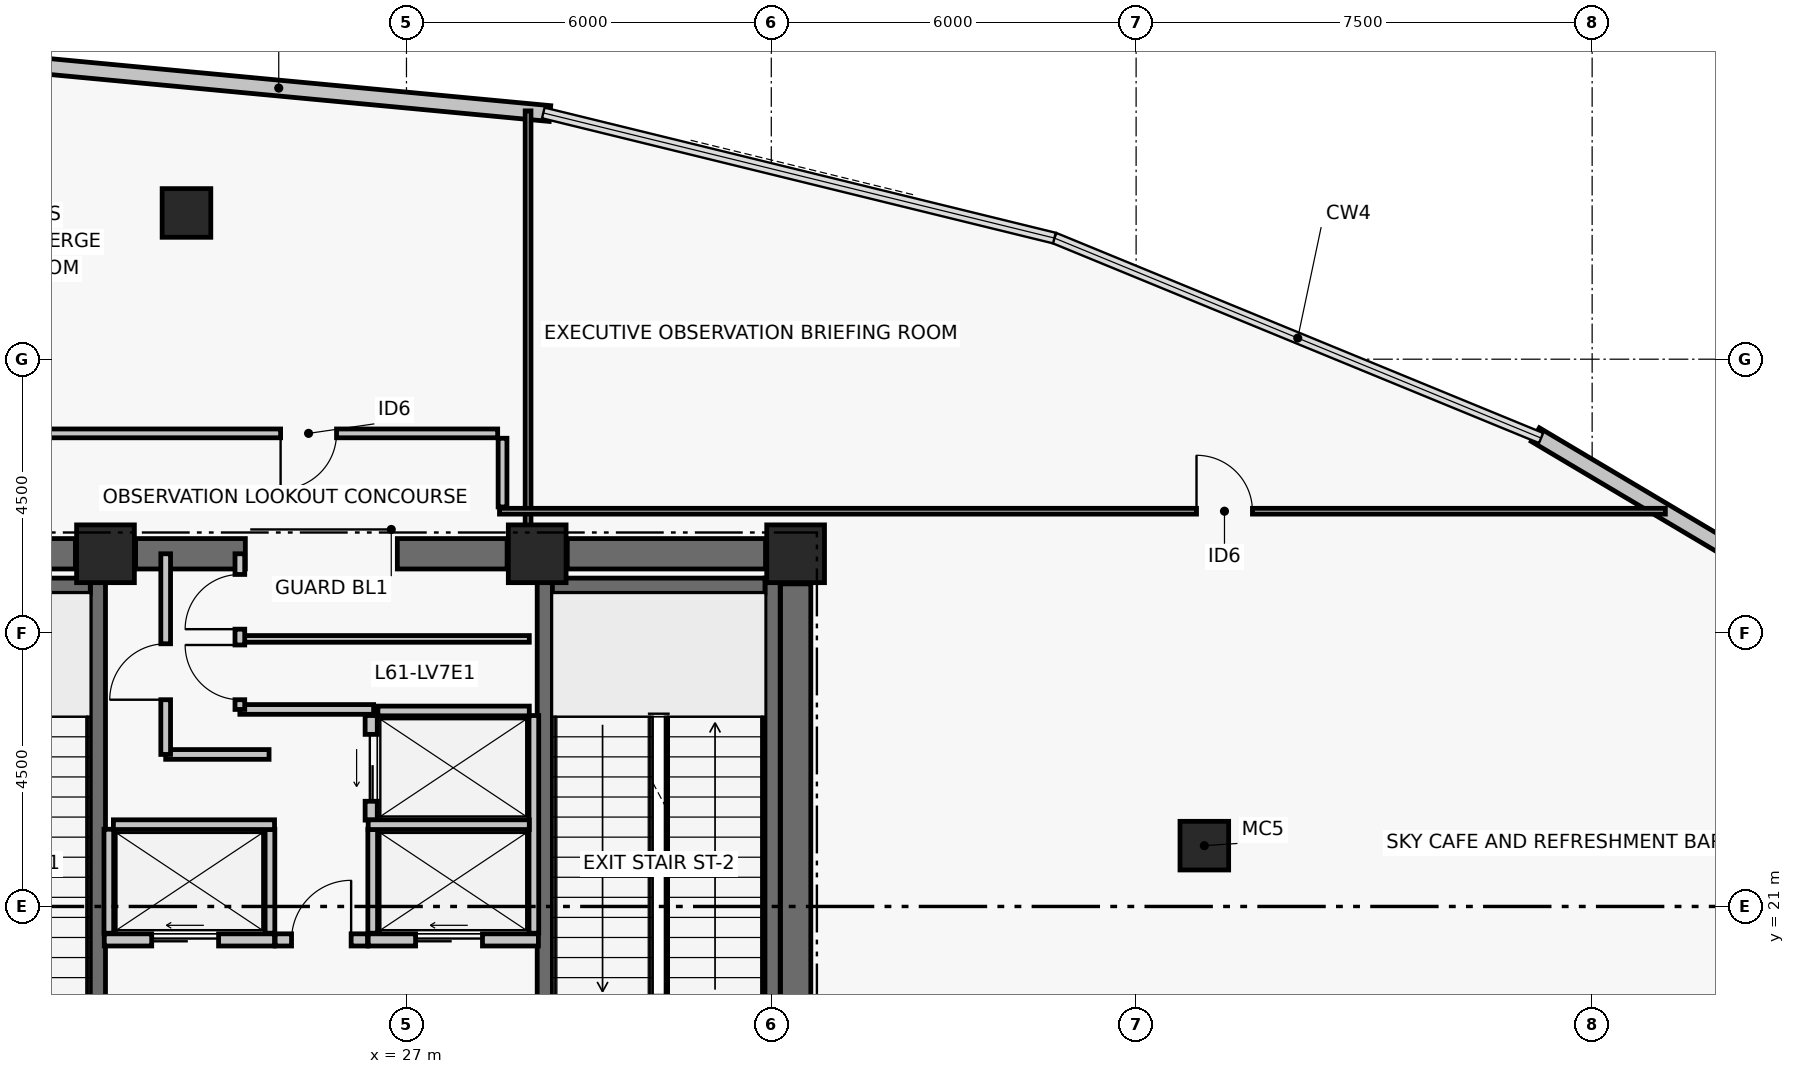
"""IFC4 building model, lengths in metres.
Left out: names, types, materials, properties, quantities, classifications, styles, units other than length and angle.
Written with IfcOpenShell. Run it as: python <this file> out.ifc"""

import sys

from ifc_helpers import new_model, si_unit, direction, frame, frame_2d, origin, origin_2d, place, context, subcontext, project, spatial, rectangle, hollow_rectangle, extrude, element, fill, save


model = new_model("IFC4")
c1 = context("Model", 3, precision=1e-05, world=origin(), true_north=direction((0.0, 1.0)))
c2 = subcontext(c1, "Body", "Model", "MODEL_VIEW")
j1 = project(units=[si_unit("LENGTHUNIT", "METRE"), si_unit("PLANEANGLEUNIT", "RADIAN")], contexts=[c1])
p1 = place(None, origin())
s1 = spatial("IfcSite", under=j1, at=p1, CompositionType="ELEMENT")
p2 = place(p1, origin())
s2 = spatial("IfcBuilding", under=s1, at=p2, CompositionType="ELEMENT")
p3 = place(p2, frame((0.0, 0.0, 242.64)))
s3 = spatial("IfcBuildingStorey", under=s2, at=p3, CompositionType="ELEMENT", Elevation=242.64)
for number, where, z_axis, x_axis in (
    (1, (22.05, 26.8, 0.0), (0.0, 0.0, 1.0), (1.0, 0.0, 0.0)),
    (2, (29.15, 26.8, 0.0), (0.0, 0.0, 1.0), (1.0, 0.0, 0.0)),
    (3, (33.4, 26.8, 0.0), (0.0, 0.0, 1.0), (1.0, 0.0, 0.0)),
):
    element("IfcColumn", number, at=place(p3, frame(where, z_axis=z_axis, x_axis=x_axis)), inside=s3, PredefinedType="COLUMN", context=c2, shape_type="SweptSolid", body=[
        extrude(rectangle(XDim=0.95, YDim=0.95, at=origin_2d()), origin(), (0.0, 0.0, 1.0), 4.5),
    ])
p4 = place(p3, frame((18.295, 26.8, 0.0), z_axis=(0.0, 0.0, 1.0), x_axis=(1.0, 0.0, 0.0)))
e4 = element("IfcWall", 4, at=p4, inside=s3, PredefinedType="SHEAR", context=c2, shape_type="SweptSolid", body=[
    extrude(rectangle(XDim=3.26, YDim=0.5, at=frame_2d((1.63, 0.0))), origin(), (0.0, 0.0, 1.0), 4.28),
])
p5 = place(p3, frame((22.545, 26.8, 0.0), z_axis=(0.0, 0.0, 1.0), x_axis=(1.0, 0.0, 0.0)))
e5 = element("IfcWall", 5, at=p5, inside=s3, PredefinedType="SHEAR", context=c2, shape_type="SweptSolid", body=[
    extrude(rectangle(XDim=1.805, YDim=0.5, at=frame_2d((0.903, 0.0))), origin(), (0.0, 0.0, 1.0), 4.28),
])
p6 = place(p3, frame((26.85, 26.8, 0.0), z_axis=(0.0, 0.0, 1.0), x_axis=(1.0, 0.0, 0.0)))
e6 = element("IfcWall", 6, at=p6, inside=s3, PredefinedType="SHEAR", context=c2, shape_type="SweptSolid", body=[
    extrude(rectangle(XDim=1.805, YDim=0.5, at=frame_2d((0.902, 0.0))), origin(), (0.0, 0.0, 1.0), 4.28),
])
p7 = place(p3, frame((29.645, 26.8, 0.0), z_axis=(0.0, 0.0, 1.0), x_axis=(1.0, 0.0, 0.0)))
e7 = element("IfcWall", 7, at=p7, inside=s3, PredefinedType="SHEAR", context=c2, shape_type="SweptSolid", body=[
    extrude(rectangle(XDim=3.26, YDim=0.5, at=frame_2d((1.63, 0.0))), origin(), (0.0, 0.0, 1.0), 4.28),
])
p8 = place(p3, frame((33.4, 17.695, 0.0), z_axis=(0.0, 0.0, 1.0), x_axis=(0.0, 1.0, 0.0)))
e8 = element("IfcWall", 8, at=p8, inside=s3, PredefinedType="SHEAR", context=c2, shape_type="SweptSolid", body=[
    extrude(rectangle(XDim=8.61, YDim=0.5, at=frame_2d((4.305, 0.0))), origin(), (0.0, 0.0, 1.0), 4.28),
])
p9 = place(p3, frame((21.925, 17.6, 0.0), z_axis=(0.0, 0.0, 1.0), x_axis=(0.0, 1.0, 0.0)))
e9 = element("IfcWall", 9, at=p9, inside=s3, PredefinedType="SHEAR", context=c2, shape_type="SweptSolid", body=[
    extrude(rectangle(XDim=8.8, YDim=0.25, at=frame_2d((4.4, 0.0))), origin(), (0.0, 0.0, 1.0), 4.28),
])
p10 = place(p9, frame((0.35, 0.0, 0.0)))
e10 = element("IfcOpeningElement", 10, at=p10, cuts=e9, PredefinedType="OPENING", context=c2, shape_type="SweptSolid", body=[
    extrude(rectangle(XDim=1.05, YDim=2.08, at=frame_2d((0.525, 1.04))), frame((0.0, 0.135, 0.0), z_axis=(0.0, -1.0, 0.0), x_axis=(1.0, 0.0, 0.0)), (0.0, 0.0, 1.0), 0.27),
])
p11 = place(p3, frame((18.304, 26.275, 0.0), z_axis=(0.0, 0.0, 1.0), x_axis=(1.0, 0.0, 0.0)))
e11 = element("IfcWall", 11, at=p11, inside=s3, PredefinedType="SHEAR", context=c2, shape_type="SweptSolid", body=[
    extrude(rectangle(XDim=3.496, YDim=0.25, at=frame_2d((1.748, 0.0))), origin(), (0.0, 0.0, 1.0), 4.28),
])
p12 = place(p3, frame((29.275, 17.6, 0.0), z_axis=(0.0, 0.0, 1.0), x_axis=(0.0, 1.0, 0.0)))
e12 = element("IfcWall", 12, at=p12, inside=s3, PredefinedType="SHEAR", context=c2, shape_type="SweptSolid", body=[
    extrude(rectangle(XDim=8.8, YDim=0.25, at=frame_2d((4.4, 0.0))), origin(), (0.0, 0.0, 1.0), 4.28),
])
p13 = place(p12, frame((0.35, 0.0, 0.0)))
e13 = element("IfcOpeningElement", 13, at=p13, cuts=e12, PredefinedType="OPENING", context=c2, shape_type="SweptSolid", body=[
    extrude(rectangle(XDim=1.05, YDim=2.08, at=frame_2d((0.525, 1.04))), frame((0.0, 0.135, 0.0), z_axis=(0.0, -1.0, 0.0), x_axis=(1.0, 0.0, 0.0)), (0.0, 0.0, 1.0), 0.27),
])
p14 = place(p3, frame((33.021, 17.6, 0.0), z_axis=(0.0, 0.0, 1.0), x_axis=(0.0, 1.0, 0.0)))
e14 = element("IfcWall", 14, at=p14, inside=s3, PredefinedType="SHEAR", context=c2, shape_type="SweptSolid", body=[
    extrude(rectangle(XDim=8.8, YDim=0.25, at=frame_2d((4.4, 0.0))), origin(), (0.0, 0.0, 1.0), 4.28),
])
p15 = place(p3, frame((29.4, 26.275, 0.0), z_axis=(0.0, 0.0, 1.0), x_axis=(1.0, 0.0, 0.0)))
e15 = element("IfcWall", 15, at=p15, inside=s3, PredefinedType="SHEAR", context=c2, shape_type="SweptSolid", body=[
    extrude(rectangle(XDim=3.496, YDim=0.25, at=frame_2d((1.748, 0.0))), origin(), (0.0, 0.0, 1.0), 4.28),
])
for number, where, z_axis, x_axis in (
    (16, (40.122, 22.0, 0.0), (0.0, 0.0, 1.0), (1.0, 0.0, 0.0)),
    (17, (23.382, 32.405, 0.0), (0.0, 0.0, 1.0), (1.0, 0.0, 0.0)),
):
    element("IfcColumn", number, at=place(p3, frame(where, z_axis=z_axis, x_axis=x_axis)), inside=s3, PredefinedType="COLUMN", context=c2, shape_type="SweptSolid", body=[
        extrude(hollow_rectangle(XDim=0.8, YDim=0.8, WallThickness=0.035, at=origin_2d()), origin(), (0.0, 0.0, 1.0), 4.5),
    ])
p16 = place(p3, frame((45.566, 28.76, 0.0), z_axis=(0.0, 0.0, 1.0), x_axis=(0.859615449495, -0.510941561227, 0.0)))
e18 = element("IfcWall", 18, at=p16, inside=s3, PredefinedType="PARTITIONING", context=c2, shape_type="SweptSolid", body=[
    extrude(rectangle(XDim=8.961, YDim=0.26, at=frame_2d((4.48, 0.0))), origin(), (0.0, 0.0, 1.0), 4.28),
])
p17 = place(p3, frame((20.438, 34.878, 0.0), z_axis=(0.0, 0.0, 1.0), x_axis=(0.995616246459, -0.093532292754, 0.0)))
e19 = element("IfcWall", 19, at=p17, inside=s3, PredefinedType="PARTITIONING", context=c2, shape_type="SweptSolid", body=[
    extrude(rectangle(XDim=8.961, YDim=0.26, at=frame_2d((4.48, 0.0))), origin(), (0.0, 0.0, 1.0), 4.28),
])
p18 = place(p3, frame((53.269, 19.819, 0.0), z_axis=(0.0, 0.0, 1.0), x_axis=(-0.859615449495, -0.510941561227, 0.0)))
e20 = element("IfcWall", 20, at=p18, inside=s3, PredefinedType="PARTITIONING", context=c2, shape_type="SweptSolid", body=[
    extrude(rectangle(XDim=8.961, YDim=0.26, at=frame_2d((4.48, 0.0))), origin(), (0.0, 0.0, 1.0), 4.28),
])
p19 = place(p3, frame((24.84, 20.45, 0.0), z_axis=(0.0, 0.0, 1.0), x_axis=(1.0, 0.0, 0.0)))
e21 = element("IfcWall", 21, at=p19, inside=s3, PredefinedType="PARTITIONING", context=c2, shape_type="SweptSolid", body=[
    extrude(rectangle(XDim=1.52, YDim=0.2, at=frame_2d((0.76, 0.0))), origin(), (0.0, 0.0, 1.0), 4.28),
])
p20 = place(p19, frame((0.27, 0.0, 0.0)))
e22 = element("IfcOpeningElement", 22, at=p20, cuts=e21, PredefinedType="OPENING", context=c2, shape_type="SweptSolid", body=[
    extrude(rectangle(XDim=0.98, YDim=2.06, at=frame_2d((0.49, 1.03))), frame((0.0, 0.11, 0.0), z_axis=(0.0, -1.0, 0.0), x_axis=(1.0, 0.0, 0.0)), (0.0, 0.0, 1.0), 0.22),
])
p21 = place(p3, frame((22.03, 20.45, 0.0), z_axis=(0.0, 0.0, 1.0), x_axis=(1.0, 0.0, 0.0)))
e23 = element("IfcWall", 23, at=p21, inside=s3, PredefinedType="PARTITIONING", context=c2, shape_type="SweptSolid", body=[
    extrude(rectangle(XDim=2.8, YDim=0.2, at=frame_2d((1.4, 0.0))), origin(), (0.0, 0.0, 1.0), 4.28),
])
p22 = place(p21, frame((0.78, 0.0, 0.0)))
e24 = element("IfcOpeningElement", 24, at=p22, cuts=e23, PredefinedType="OPENING", context=c2, shape_type="SweptSolid", body=[
    extrude(rectangle(XDim=1.1, YDim=2.08, at=frame_2d((0.55, 1.04))), frame((0.0, 0.11, 0.0), z_axis=(0.0, -1.0, 0.0), x_axis=(1.0, 0.0, 0.0)), (0.0, 0.0, 1.0), 0.22),
])
p23 = place(p3, frame((26.37, 20.45, 0.0), z_axis=(0.0, 0.0, 1.0), x_axis=(1.0, 0.0, 0.0)))
e25 = element("IfcWall", 25, at=p23, inside=s3, PredefinedType="PARTITIONING", context=c2, shape_type="SweptSolid", body=[
    extrude(rectangle(XDim=2.8, YDim=0.2, at=frame_2d((1.4, 0.0))), origin(), (0.0, 0.0, 1.0), 4.28),
])
p24 = place(p23, frame((0.78, 0.0, 0.0)))
e26 = element("IfcOpeningElement", 26, at=p24, cuts=e25, PredefinedType="OPENING", context=c2, shape_type="SweptSolid", body=[
    extrude(rectangle(XDim=1.1, YDim=2.08, at=frame_2d((0.55, 1.04))), frame((0.0, 0.11, 0.0), z_axis=(0.0, -1.0, 0.0), x_axis=(1.0, 0.0, 0.0)), (0.0, 0.0, 1.0), 0.22),
])
p25 = place(p3, frame((26.42, 22.42, 0.0), z_axis=(0.0, 0.0, 1.0), x_axis=(0.0, 1.0, 0.0)))
e27 = element("IfcWall", 27, at=p25, inside=s3, PredefinedType="PARTITIONING", context=c2, shape_type="SweptSolid", body=[
    extrude(rectangle(XDim=1.72, YDim=0.2, at=frame_2d((0.86, 0.0))), origin(), (0.0, 0.0, 1.0), 4.28),
])
p26 = place(p25, frame((0.31, 0.0, 0.0)))
e28 = element("IfcOpeningElement", 28, at=p26, cuts=e27, PredefinedType="OPENING", context=c2, shape_type="SweptSolid", body=[
    extrude(rectangle(XDim=1.1, YDim=2.08, at=frame_2d((0.55, 1.04))), frame((0.0, 0.11, 0.0), z_axis=(0.0, -1.0, 0.0), x_axis=(1.0, 0.0, 0.0)), (0.0, 0.0, 1.0), 0.22),
])
for number, where, z_axis, x_axis in (
    (29, (22.105, 20.56, 0.0), (0.0, 0.0, 1.0), (0.0, 1.0, 0.0)),
    (30, (24.755, 20.56, 0.0), (0.0, 0.0, 1.0), (0.0, 1.0, 0.0)),
):
    element("IfcWall", number, at=place(p3, frame(where, z_axis=z_axis, x_axis=x_axis)), inside=s3, PredefinedType="PARTITIONING", context=c2, shape_type="SweptSolid", body=[
        extrude(rectangle(XDim=1.71, YDim=0.16, at=frame_2d((0.855, 0.0))), origin(), (0.0, 0.0, 1.0), 4.28),
    ])
p27 = place(p3, frame((22.18, 22.345, 0.0), z_axis=(0.0, 0.0, 1.0), x_axis=(1.0, 0.0, 0.0)))
e31 = element("IfcWall", 31, at=p27, inside=s3, PredefinedType="PARTITIONING", context=c2, shape_type="SweptSolid", body=[
    extrude(rectangle(XDim=2.65, YDim=0.16, at=frame_2d((1.325, 0.0))), origin(), (0.0, 0.0, 1.0), 4.28),
])
p28 = place(p3, frame((29.095, 20.56, 0.0), z_axis=(0.0, 0.0, 1.0), x_axis=(0.0, 1.0, 0.0)))
e32 = element("IfcWall", 32, at=p28, inside=s3, PredefinedType="PARTITIONING", context=c2, shape_type="SweptSolid", body=[
    extrude(rectangle(XDim=3.58, YDim=0.16, at=frame_2d((1.79, 0.0))), origin(), (0.0, 0.0, 1.0), 4.28),
])
p29 = place(p3, frame((26.445, 20.56, 0.0), z_axis=(0.0, 0.0, 1.0), x_axis=(0.0, 1.0, 0.0)))
e33 = element("IfcWall", 33, at=p29, inside=s3, PredefinedType="PARTITIONING", context=c2, shape_type="SweptSolid", body=[
    extrude(rectangle(XDim=1.71, YDim=0.16, at=frame_2d((0.855, 0.0))), origin(), (0.0, 0.0, 1.0), 4.28),
])
p30 = place(p3, frame((26.37, 22.345, 0.0), z_axis=(0.0, 0.0, 1.0), x_axis=(1.0, 0.0, 0.0)))
e34 = element("IfcWall", 34, at=p30, inside=s3, PredefinedType="PARTITIONING", context=c2, shape_type="SweptSolid", body=[
    extrude(rectangle(XDim=2.65, YDim=0.16, at=frame_2d((1.325, 0.0))), origin(), (0.0, 0.0, 1.0), 4.28),
])
p31 = place(p3, frame((26.53, 24.215, 0.0), z_axis=(0.0, 0.0, 1.0), x_axis=(1.0, 0.0, 0.0)))
e35 = element("IfcWall", 35, at=p31, inside=s3, PredefinedType="PARTITIONING", context=c2, shape_type="SweptSolid", body=[
    extrude(rectangle(XDim=2.49, YDim=0.16, at=frame_2d((1.245, 0.0))), origin(), (0.0, 0.0, 1.0), 4.28),
])
p32 = place(p3, frame((23.04, 23.5, 0.0), z_axis=(0.0, 0.0, 1.0), x_axis=(1.0, 0.0, 0.0)))
e36 = element("IfcWall", 36, at=p32, inside=s3, PredefinedType="PARTITIONING", context=c2, shape_type="SweptSolid", body=[
    extrude(rectangle(XDim=1.7, YDim=0.16, at=frame_2d((0.85, 0.0))), origin(), (0.0, 0.0, 1.0), 4.28),
])
p33 = place(p3, frame((23.04, 23.5, 0.0), z_axis=(0.0, 0.0, 1.0), x_axis=(0.0, 1.0, 0.0)))
e37 = element("IfcWall", 37, at=p33, inside=s3, PredefinedType="PARTITIONING", context=c2, shape_type="SweptSolid", body=[
    extrude(rectangle(XDim=3.3, YDim=0.16, at=frame_2d((1.65, 0.0))), origin(), (0.0, 0.0, 1.0), 3.41),
])
p34 = place(p33, frame((0.9, 0.0, 0.0)))
e38 = element("IfcOpeningElement", 38, at=p34, cuts=e37, PredefinedType="OPENING", context=c2, shape_type="SweptSolid", body=[
    extrude(rectangle(XDim=0.92, YDim=2.05, at=frame_2d((0.46, 1.025))), frame((0.0, 0.09, 0.0), z_axis=(0.0, -1.0, 0.0), x_axis=(1.0, 0.0, 0.0)), (0.0, 0.0, 1.0), 0.18),
])
p35 = place(p3, frame((24.26, 24.24, 0.0), z_axis=(0.0, 0.0, 1.0), x_axis=(1.0, 0.0, 0.0)))
e39 = element("IfcWall", 39, at=p35, inside=s3, PredefinedType="PARTITIONING", context=c2, shape_type="SweptSolid", body=[
    extrude(rectangle(XDim=2.2, YDim=0.16, at=frame_2d((1.1, 0.0))), origin(), (0.0, 0.0, 1.0), 4.28),
])
p36 = place(p3, frame((24.26, 25.4, 0.0), z_axis=(0.0, 0.0, 1.0), x_axis=(1.0, 0.0, 0.0)))
e40 = element("IfcWall", 40, at=p36, inside=s3, PredefinedType="PARTITIONING", context=c2, shape_type="SweptSolid", body=[
    extrude(rectangle(XDim=4.76, YDim=0.11, at=frame_2d((2.38, 0.0))), origin(), (0.0, 0.0, 1.0), 4.28),
])
p37 = place(p3, frame((24.26, 24.24, 0.0), z_axis=(0.0, 0.0, 1.0), x_axis=(0.0, 1.0, 0.0)))
e41 = element("IfcWall", 41, at=p37, inside=s3, PredefinedType="PARTITIONING", context=c2, shape_type="SweptSolid", body=[
    extrude(rectangle(XDim=2.56, YDim=0.16, at=frame_2d((1.28, 0.0))), origin(), (0.0, 0.0, 1.0), 3.41),
])
p38 = place(p37, frame((0.16, 0.0, 0.0)))
e42 = element("IfcOpeningElement", 42, at=p38, cuts=e41, PredefinedType="OPENING", context=c2, shape_type="SweptSolid", body=[
    extrude(rectangle(XDim=0.9, YDim=2.02, at=frame_2d((0.45, 1.01))), frame((0.0, 0.09, 0.0), z_axis=(0.0, -1.0, 0.0), x_axis=(1.0, 0.0, 0.0)), (0.0, 0.0, 1.0), 0.18),
])
p39 = place(p37, frame((1.32, 0.0, 0.0)))
e43 = element("IfcOpeningElement", 43, at=p39, cuts=e41, PredefinedType="OPENING", context=c2, shape_type="SweptSolid", body=[
    extrude(rectangle(XDim=0.9, YDim=2.02, at=frame_2d((0.45, 1.01))), frame((0.0, 0.09, 0.0), z_axis=(0.0, -1.0, 0.0), x_axis=(1.0, 0.0, 0.0)), (0.0, 0.0, 1.0), 0.18),
])
p40 = place(p3, frame((28.58, 27.57, 0.0), z_axis=(0.0, 0.0, 1.0), x_axis=(0.0, 1.0, 0.0)))
e44 = element("IfcWall", 44, at=p40, inside=s3, PredefinedType="PARTITIONING", context=c2, shape_type="SweptSolid", body=[
    extrude(rectangle(XDim=1.13, YDim=0.145, at=frame_2d((0.565, 0.0))), origin(), (0.0, 0.0, 1.0), 4.28),
])
p41 = place(p3, frame((28.5, 28.78, 0.0), z_axis=(0.0, 0.0, 1.0), x_axis=(-1.0, 0.0, 0.0)))
e45 = element("IfcWall", 45, at=p41, inside=s3, PredefinedType="PARTITIONING", context=c2, shape_type="SweptSolid", body=[
    extrude(rectangle(XDim=10.96, YDim=0.145, at=frame_2d((5.48, 0.0))), origin(), (0.0, 0.0, 1.0), 3.56),
])
p42 = place(p41, frame((2.65, 0.0, 0.0)))
e46 = element("IfcOpeningElement", 46, at=p42, cuts=e45, PredefinedType="OPENING", context=c2, shape_type="SweptSolid", body=[
    extrude(rectangle(XDim=0.92, YDim=2.05, at=frame_2d((0.46, 1.025))), frame((0.0, 0.083, 0.0), z_axis=(0.0, -1.0, 0.0), x_axis=(1.0, 0.0, 0.0)), (0.0, 0.0, 1.0), 0.165),
])
p43 = place(p3, frame((29.0, 27.17, 0.0), z_axis=(0.0, 0.0, 1.0), x_axis=(0.0, 1.0, 0.0)))
e47 = element("IfcWall", 47, at=p43, inside=s3, PredefinedType="PARTITIONING", context=c2, shape_type="SweptSolid", body=[
    extrude(rectangle(XDim=6.914, YDim=0.095, at=frame_2d((3.457, 0.0))), origin(), (0.0, 0.0, 1.0), 3.41),
])
p44 = place(p3, frame((28.53, 27.5, 0.0), z_axis=(0.0, 0.0, 1.0), x_axis=(1.0, 0.0, 0.0)))
e48 = element("IfcWall", 48, at=p44, inside=s3, PredefinedType="PARTITIONING", context=c2, shape_type="SweptSolid", body=[
    extrude(rectangle(XDim=19.174, YDim=0.095, at=frame_2d((9.587, 0.0))), origin(), (0.0, 0.0, 1.0), 3.76),
])
p45 = place(p44, frame((11.463, 0.0, 0.0)))
e49 = element("IfcOpeningElement", 49, at=p45, cuts=e48, PredefinedType="OPENING", context=c2, shape_type="SweptSolid", body=[
    extrude(rectangle(XDim=0.92, YDim=2.05, at=frame_2d((0.46, 1.025))), frame((0.0, 0.057, 0.0), z_axis=(0.0, -1.0, 0.0), x_axis=(1.0, 0.0, 0.0)), (0.0, 0.0, 1.0), 0.115),
])
p46 = place(p20, origin())
e50 = element("IfcDoor", 50, at=p46, inside=s3, OperationType="SINGLE_SWING_RIGHT", PredefinedType="DOOR", context=c2, shape_type="SweptSolid", body=[
    extrude(rectangle(XDim=0.98, YDim=2.06, at=frame_2d((0.49, 1.03))), frame((0.0, 0.025, 0.0), z_axis=(0.0, -1.0, 0.0), x_axis=(1.0, 0.0, 0.0)), (0.0, 0.0, 1.0), 0.05),
])
fill(e22, e50)
p47 = place(p22, origin())
e51 = element("IfcDoor", 51, at=p47, inside=s3, OperationType="DOUBLE_DOOR_SLIDING", PredefinedType="DOOR", context=c2, shape_type="SweptSolid", body=[
    extrude(rectangle(XDim=1.1, YDim=2.08, at=frame_2d((0.55, 1.04))), frame((0.0, 0.025, 0.0), z_axis=(0.0, -1.0, 0.0), x_axis=(1.0, 0.0, 0.0)), (0.0, 0.0, 1.0), 0.05),
])
fill(e24, e51)
p48 = place(p24, origin())
e52 = element("IfcDoor", 52, at=p48, inside=s3, OperationType="DOUBLE_DOOR_SLIDING", PredefinedType="DOOR", context=c2, shape_type="SweptSolid", body=[
    extrude(rectangle(XDim=1.1, YDim=2.08, at=frame_2d((0.55, 1.04))), frame((0.0, 0.025, 0.0), z_axis=(0.0, -1.0, 0.0), x_axis=(1.0, 0.0, 0.0)), (0.0, 0.0, 1.0), 0.05),
])
fill(e26, e52)
p49 = place(p26, origin())
e53 = element("IfcDoor", 53, at=p49, inside=s3, OperationType="DOUBLE_DOOR_SLIDING", PredefinedType="DOOR", context=c2, shape_type="SweptSolid", body=[
    extrude(rectangle(XDim=1.1, YDim=2.08, at=frame_2d((0.55, 1.04))), frame((0.0, 0.025, 0.0), z_axis=(0.0, -1.0, 0.0), x_axis=(1.0, 0.0, 0.0)), (0.0, 0.0, 1.0), 0.05),
])
fill(e28, e53)
p50 = place(p34, origin())
e54 = element("IfcDoor", 54, at=p50, inside=s3, OperationType="SINGLE_SWING_LEFT", PredefinedType="DOOR", context=c2, shape_type="SweptSolid", body=[
    extrude(rectangle(XDim=0.92, YDim=2.05, at=frame_2d((0.46, 1.025))), frame((0.0, 0.025, 0.0), z_axis=(0.0, -1.0, 0.0), x_axis=(1.0, 0.0, 0.0)), (0.0, 0.0, 1.0), 0.05),
])
fill(e38, e54)
p51 = place(p38, origin())
e55 = element("IfcDoor", 55, at=p51, inside=s3, OperationType="SINGLE_SWING_RIGHT", PredefinedType="DOOR", context=c2, shape_type="SweptSolid", body=[
    extrude(rectangle(XDim=0.9, YDim=2.02, at=frame_2d((0.45, 1.01))), frame((0.0, 0.025, 0.0), z_axis=(0.0, -1.0, 0.0), x_axis=(1.0, 0.0, 0.0)), (0.0, 0.0, 1.0), 0.05),
])
fill(e42, e55)
p52 = place(p39, origin())
e56 = element("IfcDoor", 56, at=p52, inside=s3, OperationType="SINGLE_SWING_LEFT", PredefinedType="DOOR", context=c2, shape_type="SweptSolid", body=[
    extrude(rectangle(XDim=0.9, YDim=2.02, at=frame_2d((0.45, 1.01))), frame((0.0, 0.025, 0.0), z_axis=(0.0, -1.0, 0.0), x_axis=(1.0, 0.0, 0.0)), (0.0, 0.0, 1.0), 0.05),
])
fill(e43, e56)
p53 = place(p42, origin())
e57 = element("IfcDoor", 57, at=p53, inside=s3, OperationType="SINGLE_SWING_RIGHT", PredefinedType="DOOR", context=c2, shape_type="SweptSolid", body=[
    extrude(rectangle(XDim=0.92, YDim=2.05, at=frame_2d((0.46, 1.025))), frame((0.0, 0.025, 0.0), z_axis=(0.0, -1.0, 0.0), x_axis=(1.0, 0.0, 0.0)), (0.0, 0.0, 1.0), 0.05),
])
fill(e46, e57)
p54 = place(p45, origin())
e58 = element("IfcDoor", 58, at=p54, inside=s3, OperationType="SINGLE_SWING_LEFT", PredefinedType="DOOR", context=c2, shape_type="SweptSolid", body=[
    extrude(rectangle(XDim=0.92, YDim=2.05, at=frame_2d((0.46, 1.025))), frame((0.0, 0.025, 0.0), z_axis=(0.0, -1.0, 0.0), x_axis=(1.0, 0.0, 0.0)), (0.0, 0.0, 1.0), 0.05),
])
fill(e49, e58)
save(model, sys.argv[1])
